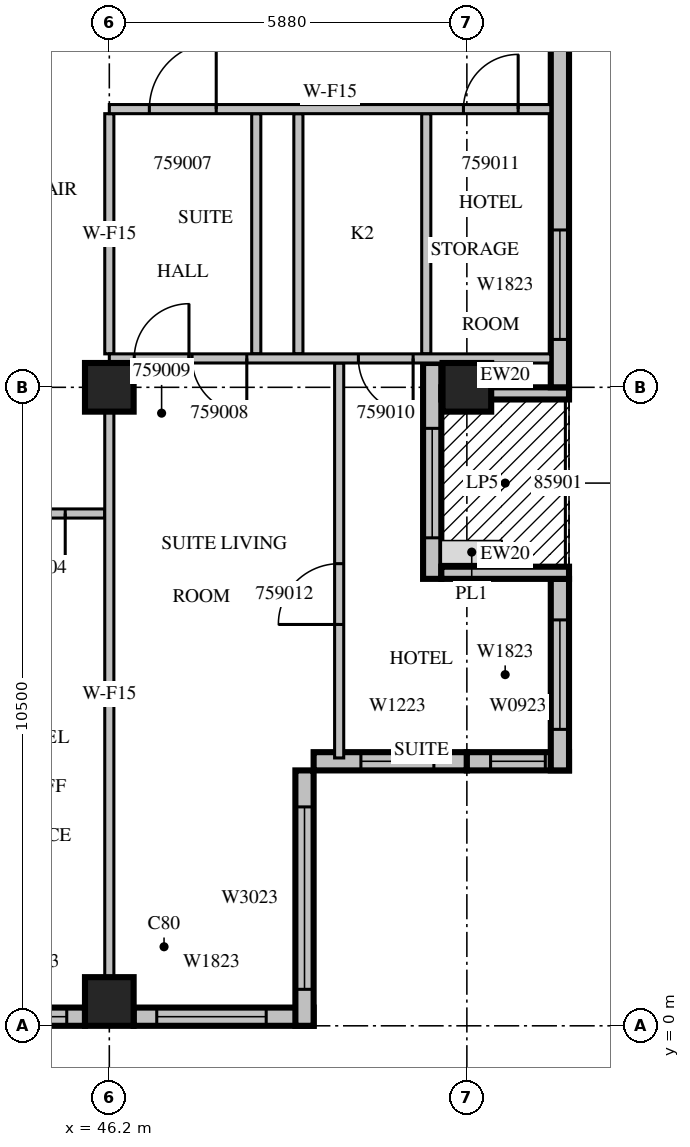
"""IFC4 building model, lengths in metres.
Left out: names, types, materials, properties, quantities, classifications, styles, units other than length and angle.
Written with IfcOpenShell. Run it as: python <this file> out.ifc"""

import sys

from ifc_helpers import new_model, si_unit, direction, frame, frame_2d, origin, origin_2d, place, context, subcontext, project, spatial, rectangle, extrude, source, transform, mapped, element, fill, save


model = new_model("IFC4")
c1 = context("Model", 3, precision=1e-05, world=origin(), true_north=direction((0.0, 1.0)))
c2 = subcontext(c1, "Body", "Model", "MODEL_VIEW")
j1 = project(units=[si_unit("LENGTHUNIT", "METRE"), si_unit("PLANEANGLEUNIT", "RADIAN")], contexts=[c1])
p1 = place(None, origin())
s1 = spatial("IfcSite", under=j1, at=p1, CompositionType="ELEMENT")
p2 = place(p1, origin())
s2 = spatial("IfcBuilding", under=s1, at=p2, CompositionType="ELEMENT")
p3 = place(p2, frame((0.0, 0.0, 257.6)))
s3 = spatial("IfcBuildingStorey", under=s2, at=p3, CompositionType="ELEMENT", Elevation=257.6)
m1 = source(origin(), c2, "Body", "SweptSolid", [
    extrude(rectangle(XDim=0.8, YDim=0.8, at=origin_2d()), origin(), (0.0, 0.0, 1.0), 3.8),
])
for number, where, z_axis, x_axis in (
    (1, (46.2, 0.4, 0.0), (0.0, 0.0, 1.0), (1.0, 0.0, 0.0)),
    (2, (46.2, 10.5, 0.0), (0.0, 0.0, 1.0), (1.0, 0.0, 0.0)),
    (3, (52.08, 10.5, 0.0), (0.0, 0.0, 1.0), (1.0, 0.0, 0.0)),
):
    element("IfcColumn", number, at=place(p3, frame(where, z_axis=z_axis, x_axis=x_axis)), inside=s3, PredefinedType="COLUMN", context=c2, shape_type="MappedRepresentation", body=[
        mapped(m1, transform((0.0, 0.0, 0.0), scale=1.0)),
    ])
m2 = source(origin(), c2, "Body", "SweptSolid", [
    extrude(rectangle(XDim=1.8, YDim=0.3, at=frame_2d((0.9, 0.0))), origin(), (0.0, 0.0, 1.0), 3.4),
])
p4 = place(p3, frame((44.0, 0.15, 0.0), z_axis=(0.0, 0.0, 1.0), x_axis=(1.0, 0.0, 0.0)))
e4 = element("IfcWall", 4, at=p4, inside=s3, PredefinedType="STANDARD", context=c2, shape_type="MappedRepresentation", body=[
    mapped(m2, transform((0.0, 0.0, 0.0), scale=1.0)),
])
m3 = source(origin(), c2, "Body", "SweptSolid", [
    extrude(rectangle(XDim=1.2, YDim=2.3, at=frame_2d((0.6, 1.15))), frame((0.0, 0.16, 0.0), z_axis=(0.0, -1.0, 0.0), x_axis=(1.0, 0.0, 0.0)), (0.0, 0.0, 1.0), 0.32),
])
p5 = place(p4, frame((0.3, 0.0, 0.6)))
e5 = element("IfcOpeningElement", 5, at=p5, cuts=e4, PredefinedType="OPENING", context=c2, shape_type="MappedRepresentation", body=[
    mapped(m3, transform((0.0, 0.0, 0.0), scale=1.0)),
])
m4 = source(origin(), c2, "Body", "SweptSolid", [
    extrude(rectangle(XDim=2.96, YDim=0.3, at=frame_2d((1.48, 0.0))), origin(), (0.0, 0.0, 1.0), 3.4),
])
p6 = place(p3, frame((46.6, 0.15, 0.0), z_axis=(0.0, 0.0, 1.0), x_axis=(1.0, 0.0, 0.0)))
e6 = element("IfcWall", 6, at=p6, inside=s3, PredefinedType="STANDARD", context=c2, shape_type="MappedRepresentation", body=[
    mapped(m4, transform((0.0, 0.0, 0.0), scale=1.0)),
])
m5 = source(origin(), c2, "Body", "SweptSolid", [
    extrude(rectangle(XDim=1.8, YDim=2.3, at=frame_2d((0.9, 1.15))), frame((0.0, 0.16, 0.0), z_axis=(0.0, -1.0, 0.0), x_axis=(1.0, 0.0, 0.0)), (0.0, 0.0, 1.0), 0.32),
])
p7 = place(p6, frame((0.38, 0.0, 0.6)))
e7 = element("IfcOpeningElement", 7, at=p7, cuts=e6, PredefinedType="OPENING", context=c2, shape_type="MappedRepresentation", body=[
    mapped(m5, transform((0.0, 0.0, 0.0), scale=1.0)),
])
m6 = source(origin(), c2, "Body", "SweptSolid", [
    extrude(rectangle(XDim=4.2, YDim=0.3, at=frame_2d((2.1, 0.0))), origin(), (0.0, 0.0, 1.0), 3.4),
])
p8 = place(p3, frame((49.41, 0.0, 0.0), z_axis=(0.0, 0.0, 1.0), x_axis=(0.0, 1.0, 0.0)))
e8 = element("IfcWall", 8, at=p8, inside=s3, PredefinedType="STANDARD", context=c2, shape_type="MappedRepresentation", body=[
    mapped(m6, transform((0.0, 0.0, 0.0), scale=1.0)),
])
m7 = source(origin(), c2, "Body", "SweptSolid", [
    extrude(rectangle(XDim=3.0, YDim=2.3, at=frame_2d((1.5, 1.15))), frame((0.0, 0.16, 0.0), z_axis=(0.0, -1.0, 0.0), x_axis=(1.0, 0.0, 0.0)), (0.0, 0.0, 1.0), 0.32),
])
p9 = place(p8, frame((0.6, 0.0, 0.6)))
e9 = element("IfcOpeningElement", 9, at=p9, cuts=e8, PredefinedType="OPENING", context=c2, shape_type="MappedRepresentation", body=[
    mapped(m7, transform((0.0, 0.0, 0.0), scale=1.0)),
])
m8 = source(origin(), c2, "Body", "SweptSolid", [
    extrude(rectangle(XDim=2.52, YDim=0.3, at=frame_2d((1.26, 0.0))), origin(), (0.0, 0.0, 1.0), 3.4),
])
p10 = place(p3, frame((49.56, 4.35, 0.0), z_axis=(0.0, 0.0, 1.0), x_axis=(1.0, 0.0, 0.0)))
e10 = element("IfcWall", 10, at=p10, inside=s3, PredefinedType="STANDARD", context=c2, shape_type="MappedRepresentation", body=[
    mapped(m8, transform((0.0, 0.0, 0.0), scale=1.0)),
])
p11 = place(p10, frame((0.777, 0.0, 0.6)))
e11 = element("IfcOpeningElement", 11, at=p11, cuts=e10, PredefinedType="OPENING", context=c2, shape_type="MappedRepresentation", body=[
    mapped(m3, transform((0.0, 0.0, 0.0), scale=1.0)),
])
m9 = source(origin(), c2, "Body", "SweptSolid", [
    extrude(rectangle(XDim=1.68, YDim=0.3, at=frame_2d((0.84, 0.0))), origin(), (0.0, 0.0, 1.0), 3.4),
])
p12 = place(p3, frame((52.08, 4.35, 0.0), z_axis=(0.0, 0.0, 1.0), x_axis=(1.0, 0.0, 0.0)))
e12 = element("IfcWall", 12, at=p12, inside=s3, PredefinedType="STANDARD", context=c2, shape_type="MappedRepresentation", body=[
    mapped(m9, transform((0.0, 0.0, 0.0), scale=1.0)),
])
m10 = source(origin(), c2, "Body", "SweptSolid", [
    extrude(rectangle(XDim=0.9, YDim=2.3, at=frame_2d((0.45, 1.15))), frame((0.0, 0.16, 0.0), z_axis=(0.0, -1.0, 0.0), x_axis=(1.0, 0.0, 0.0)), (0.0, 0.0, 1.0), 0.32),
])
p13 = place(p12, frame((0.39, 0.0, 0.6)))
e13 = element("IfcOpeningElement", 13, at=p13, cuts=e12, PredefinedType="OPENING", context=c2, shape_type="MappedRepresentation", body=[
    mapped(m10, transform((0.0, 0.0, 0.0), scale=1.0)),
])
m11 = source(origin(), c2, "Body", "SweptSolid", [
    extrude(rectangle(XDim=3.15, YDim=0.3, at=frame_2d((1.575, 0.0))), origin(), (0.0, 0.0, 1.0), 3.4),
])
p14 = place(p3, frame((53.61, 4.2, 0.0), z_axis=(0.0, 0.0, 1.0), x_axis=(0.0, 1.0, 0.0)))
e14 = element("IfcWall", 14, at=p14, inside=s3, PredefinedType="STANDARD", context=c2, shape_type="MappedRepresentation", body=[
    mapped(m11, transform((0.0, 0.0, 0.0), scale=1.0)),
])
p15 = place(p14, frame((0.675, 0.0, 0.6)))
e15 = element("IfcOpeningElement", 15, at=p15, cuts=e14, PredefinedType="OPENING", context=c2, shape_type="MappedRepresentation", body=[
    mapped(m5, transform((0.0, 0.0, 0.0), scale=1.0)),
])
m12 = source(origin(), c2, "Body", "SweptSolid", [
    extrude(rectangle(XDim=3.55, YDim=0.3, at=frame_2d((1.775, 0.0))), origin(), (0.0, 0.0, 1.0), 3.4),
])
p16 = place(p3, frame((51.51, 7.35, 0.0), z_axis=(0.0, 0.0, 1.0), x_axis=(0.0, 1.0, 0.0)))
e16 = element("IfcWall", 16, at=p16, inside=s3, PredefinedType="STANDARD", context=c2, shape_type="MappedRepresentation", body=[
    mapped(m12, transform((0.0, 0.0, 0.0), scale=1.0)),
])
m13 = source(origin(), c2, "Body", "SweptSolid", [
    extrude(rectangle(XDim=1.8, YDim=2.4, at=frame_2d((0.9, 1.2))), frame((0.0, 0.16, 0.0), z_axis=(0.0, -1.0, 0.0), x_axis=(1.0, 0.0, 0.0)), (0.0, 0.0, 1.0), 0.32),
])
p17 = place(p16, frame((0.675, 0.0, 0.0)))
e17 = element("IfcOpeningElement", 17, at=p17, cuts=e16, PredefinedType="OPENING", context=c2, shape_type="MappedRepresentation", body=[
    mapped(m13, transform((0.0, 0.0, 0.0), scale=1.0)),
])
m14 = source(origin(), c2, "Body", "SweptSolid", [
    extrude(rectangle(XDim=2.1, YDim=0.2, at=frame_2d((1.05, 0.0))), origin(), (0.0, 0.0, 1.0), 3.4),
])
for number, where, z_axis, x_axis in (
    (18, (53.76, 7.45, 0.0), (0.0, 0.0, 1.0), (-1.0, 0.0, 0.0)),
    (19, (53.76, 10.4, 0.0), (0.0, 0.0, 1.0), (-1.0, 0.0, 0.0)),
):
    element("IfcWall", number, at=place(p3, frame(where, z_axis=z_axis, x_axis=x_axis)), inside=s3, PredefinedType="STANDARD", context=c2, shape_type="MappedRepresentation", body=[
        mapped(m14, transform((0.0, 0.0, 0.0), scale=1.0)),
    ])
m15 = source(origin(), c2, "Body", "SweptSolid", [
    extrude(rectangle(XDim=6.75, YDim=0.3, at=frame_2d((3.375, 0.0))), origin(), (0.0, 0.0, 1.0), 3.4),
])
p18 = place(p3, frame((53.61, 10.5, 0.0), z_axis=(0.0, 0.0, 1.0), x_axis=(0.0, 1.0, 0.0)))
e20 = element("IfcWall", 20, at=p18, inside=s3, PredefinedType="STANDARD", context=c2, shape_type="MappedRepresentation", body=[
    mapped(m15, transform((0.0, 0.0, 0.0), scale=1.0)),
])
p19 = place(p18, frame((0.787, 0.0, 0.6)))
e21 = element("IfcOpeningElement", 21, at=p19, cuts=e20, PredefinedType="OPENING", context=c2, shape_type="MappedRepresentation", body=[
    mapped(m5, transform((0.0, 0.0, 0.0), scale=1.0)),
])
m16 = source(origin(), c2, "Body", "SweptSolid", [
    extrude(rectangle(XDim=2.2, YDim=0.15, at=frame_2d((1.1, 0.0))), origin(), (0.0, 0.0, 1.0), 3.4),
])
p20 = place(p3, frame((46.125, 8.425, 0.0), z_axis=(0.0, 0.0, 1.0), x_axis=(-1.0, 0.0, 0.0)))
e22 = element("IfcWall", 22, at=p20, inside=s3, PredefinedType="PARTITIONING", context=c2, shape_type="MappedRepresentation", body=[
    mapped(m16, transform((0.0, 0.0, 0.0), scale=1.0)),
])
m17 = source(origin(), c2, "Body", "SweptSolid", [
    extrude(rectangle(XDim=0.9, YDim=2.1, at=frame_2d((0.45, 1.05))), frame((0.0, 0.085, 0.0), z_axis=(0.0, -1.0, 0.0), x_axis=(1.0, 0.0, 0.0)), (0.0, 0.0, 1.0), 0.17),
])
p21 = place(p20, frame((0.65, 0.0, 0.0)))
e23 = element("IfcOpeningElement", 23, at=p21, cuts=e22, PredefinedType="OPENING", context=c2, shape_type="MappedRepresentation", body=[
    mapped(m17, transform((0.0, 0.0, 0.0), scale=1.0)),
])
m18 = source(origin(), c2, "Body", "SweptSolid", [
    extrude(rectangle(XDim=6.495, YDim=0.15, at=frame_2d((3.248, 0.0))), origin(), (0.0, 0.0, 1.0), 3.4),
])
p22 = place(p3, frame((49.98, 4.405, 0.0), z_axis=(0.0, 0.0, 1.0), x_axis=(0.0, 1.0, 0.0)))
e24 = element("IfcWall", 24, at=p22, inside=s3, PredefinedType="PARTITIONING", context=c2, shape_type="MappedRepresentation", body=[
    mapped(m18, transform((0.0, 0.0, 0.0), scale=1.0)),
])
m19 = source(origin(), c2, "Body", "SweptSolid", [
    extrude(rectangle(XDim=1.0, YDim=2.1, at=frame_2d((0.5, 1.05))), frame((0.0, 0.085, 0.0), z_axis=(0.0, -1.0, 0.0), x_axis=(1.0, 0.0, 0.0)), (0.0, 0.0, 1.0), 0.17),
])
p23 = place(p22, frame((2.195, 0.0, 0.0)))
e25 = element("IfcOpeningElement", 25, at=p23, cuts=e24, PredefinedType="OPENING", context=c2, shape_type="MappedRepresentation", body=[
    mapped(m19, transform((0.0, 0.0, 0.0), scale=1.0)),
])
m20 = source(origin(), c2, "Body", "SweptSolid", [
    extrude(rectangle(XDim=3.95, YDim=0.15, at=frame_2d((1.975, 0.0))), origin(), (0.0, 0.0, 1.0), 3.4),
])
for number, where, z_axis, x_axis in (
    (26, (48.617, 11.05, 0.0), (0.0, 0.0, 1.0), (0.0, 1.0, 0.0)),
    (27, (49.309, 11.05, 0.0), (0.0, 0.0, 1.0), (0.0, 1.0, 0.0)),
    (28, (51.412, 11.05, 0.0), (0.0, 0.0, 1.0), (0.0, 1.0, 0.0)),
):
    element("IfcWall", number, at=place(p3, frame(where, z_axis=z_axis, x_axis=x_axis)), inside=s3, PredefinedType="PARTITIONING", context=c2, shape_type="MappedRepresentation", body=[
        mapped(m20, transform((0.0, 0.0, 0.0), scale=1.0)),
    ])
m21 = source(origin(), c2, "Body", "SweptSolid", [
    extrude(rectangle(XDim=9.302, YDim=0.15, at=frame_2d((4.651, 0.0))), origin(), (0.0, 0.0, 1.0), 3.4),
])
p24 = place(p3, frame((46.2, 0.799, 0.0), z_axis=(0.0, 0.0, 1.0), x_axis=(0.0, 1.0, 0.0)))
e29 = element("IfcWall", 29, at=p24, inside=s3, PredefinedType="PARTITIONING", context=c2, shape_type="MappedRepresentation", body=[
    mapped(m21, transform((0.0, 0.0, 0.0), scale=1.0)),
])
p25 = place(p3, frame((46.2, 11.05, 0.0), z_axis=(0.0, 0.0, 1.0), x_axis=(0.0, 1.0, 0.0)))
e30 = element("IfcWall", 30, at=p25, inside=s3, PredefinedType="PARTITIONING", context=c2, shape_type="MappedRepresentation", body=[
    mapped(m20, transform((0.0, 0.0, 0.0), scale=1.0)),
])
m22 = source(origin(), c2, "Body", "SweptSolid", [
    extrude(rectangle(XDim=7.26, YDim=0.15, at=frame_2d((3.63, 0.0))), origin(), (0.0, 0.0, 1.0), 3.4),
])
p26 = place(p3, frame((53.46, 10.975, 0.0), z_axis=(0.0, 0.0, 1.0), x_axis=(-1.0, 0.0, 0.0)))
e31 = element("IfcWall", 31, at=p26, inside=s3, PredefinedType="PARTITIONING", context=c2, shape_type="MappedRepresentation", body=[
    mapped(m22, transform((0.0, 0.0, 0.0), scale=1.0)),
])
p27 = place(p26, frame((4.999, 0.0, 0.0)))
e32 = element("IfcOpeningElement", 32, at=p27, cuts=e31, PredefinedType="OPENING", context=c2, shape_type="MappedRepresentation", body=[
    mapped(m17, transform((0.0, 0.0, 0.0), scale=1.0)),
])
p28 = place(p26, frame((5.95, 0.0, 0.0)))
e33 = element("IfcOpeningElement", 33, at=p28, cuts=e31, PredefinedType="OPENING", context=c2, shape_type="MappedRepresentation", body=[
    mapped(m17, transform((0.0, 0.0, 0.0), scale=1.0)),
])
p29 = place(p26, frame((2.264, 0.0, 0.0)))
e34 = element("IfcOpeningElement", 34, at=p29, cuts=e31, PredefinedType="OPENING", context=c2, shape_type="MappedRepresentation", body=[
    mapped(m17, transform((0.0, 0.0, 0.0), scale=1.0)),
])
p30 = place(p3, frame((53.46, 15.075, 0.0), z_axis=(0.0, 0.0, 1.0), x_axis=(-1.0, 0.0, 0.0)))
e35 = element("IfcWall", 35, at=p30, inside=s3, PredefinedType="PARTITIONING", context=c2, shape_type="MappedRepresentation", body=[
    mapped(m22, transform((0.0, 0.0, 0.0), scale=1.0)),
])
m23 = source(origin(), c2, "Body", "SweptSolid", [
    extrude(rectangle(XDim=1.1, YDim=2.1, at=frame_2d((0.55, 1.05))), frame((0.0, 0.085, 0.0), z_axis=(0.0, -1.0, 0.0), x_axis=(1.0, 0.0, 0.0)), (0.0, 0.0, 1.0), 0.17),
])
p31 = place(p30, frame((5.502, 0.0, 0.0)))
e36 = element("IfcOpeningElement", 36, at=p31, cuts=e35, PredefinedType="OPENING", context=c2, shape_type="MappedRepresentation", body=[
    mapped(m23, transform((0.0, 0.0, 0.0), scale=1.0)),
])
p32 = place(p30, frame((0.536, 0.0, 0.0)))
e37 = element("IfcOpeningElement", 37, at=p32, cuts=e35, PredefinedType="OPENING", context=c2, shape_type="MappedRepresentation", body=[
    mapped(m17, transform((0.0, 0.0, 0.0), scale=1.0)),
])
m24 = source(origin(), c2, "Body", "SweptSolid", [
    extrude(rectangle(XDim=1.2, YDim=2.3, at=frame_2d((0.6, 1.15))), frame((0.0, 0.03, 0.0), z_axis=(0.0, -1.0, 0.0), x_axis=(1.0, 0.0, 0.0)), (0.0, 0.0, 1.0), 0.06),
])
p33 = place(p5, origin())
e38 = element("IfcWindow", 38, at=p33, inside=s3, PartitioningType="SINGLE_PANEL", PredefinedType="WINDOW", context=c2, shape_type="MappedRepresentation", body=[
    mapped(m24, transform((0.0, 0.0, 0.0), scale=1.0)),
])
fill(e5, e38)
m25 = source(origin(), c2, "Body", "SweptSolid", [
    extrude(rectangle(XDim=1.8, YDim=2.3, at=frame_2d((0.9, 1.15))), frame((0.0, 0.03, 0.0), z_axis=(0.0, -1.0, 0.0), x_axis=(1.0, 0.0, 0.0)), (0.0, 0.0, 1.0), 0.06),
])
p34 = place(p7, origin())
e39 = element("IfcWindow", 39, at=p34, inside=s3, PartitioningType="SINGLE_PANEL", PredefinedType="WINDOW", context=c2, shape_type="MappedRepresentation", body=[
    mapped(m25, transform((0.0, 0.0, 0.0), scale=1.0)),
])
fill(e7, e39)
m26 = source(origin(), c2, "Body", "SweptSolid", [
    extrude(rectangle(XDim=3.0, YDim=2.3, at=frame_2d((1.5, 1.15))), frame((0.0, 0.03, 0.0), z_axis=(0.0, -1.0, 0.0), x_axis=(1.0, 0.0, 0.0)), (0.0, 0.0, 1.0), 0.06),
])
p35 = place(p9, origin())
e40 = element("IfcWindow", 40, at=p35, inside=s3, PartitioningType="SINGLE_PANEL", PredefinedType="WINDOW", context=c2, shape_type="MappedRepresentation", body=[
    mapped(m26, transform((0.0, 0.0, 0.0), scale=1.0)),
])
fill(e9, e40)
p36 = place(p11, origin())
e41 = element("IfcWindow", 41, at=p36, inside=s3, PartitioningType="SINGLE_PANEL", PredefinedType="WINDOW", context=c2, shape_type="MappedRepresentation", body=[
    mapped(m24, transform((0.0, 0.0, 0.0), scale=1.0)),
])
fill(e11, e41)
m27 = source(origin(), c2, "Body", "SweptSolid", [
    extrude(rectangle(XDim=0.9, YDim=2.3, at=frame_2d((0.45, 1.15))), frame((0.0, 0.03, 0.0), z_axis=(0.0, -1.0, 0.0), x_axis=(1.0, 0.0, 0.0)), (0.0, 0.0, 1.0), 0.06),
])
p37 = place(p13, origin())
e42 = element("IfcWindow", 42, at=p37, inside=s3, PartitioningType="SINGLE_PANEL", PredefinedType="WINDOW", context=c2, shape_type="MappedRepresentation", body=[
    mapped(m27, transform((0.0, 0.0, 0.0), scale=1.0)),
])
fill(e13, e42)
p38 = place(p15, origin())
e43 = element("IfcWindow", 43, at=p38, inside=s3, PartitioningType="SINGLE_PANEL", PredefinedType="WINDOW", context=c2, shape_type="MappedRepresentation", body=[
    mapped(m25, transform((0.0, 0.0, 0.0), scale=1.0)),
])
fill(e15, e43)
m28 = source(origin(), c2, "Body", "SweptSolid", [
    extrude(rectangle(XDim=1.8, YDim=2.4, at=frame_2d((0.9, 1.2))), frame((0.0, 0.025, 0.0), z_axis=(0.0, -1.0, 0.0), x_axis=(1.0, 0.0, 0.0)), (0.0, 0.0, 1.0), 0.05),
])
p39 = place(p17, origin())
e44 = element("IfcDoor", 44, at=p39, inside=s3, OperationType="SLIDING_TO_LEFT", PredefinedType="DOOR", context=c2, shape_type="MappedRepresentation", body=[
    mapped(m28, transform((0.0, 0.0, 0.0), scale=1.0)),
])
fill(e17, e44)
p40 = place(p19, origin())
e45 = element("IfcWindow", 45, at=p40, inside=s3, PartitioningType="SINGLE_PANEL", PredefinedType="WINDOW", context=c2, shape_type="MappedRepresentation", body=[
    mapped(m25, transform((0.0, 0.0, 0.0), scale=1.0)),
])
fill(e21, e45)
m29 = source(origin(), c2, "Body", "SweptSolid", [
    extrude(rectangle(XDim=0.9, YDim=2.1, at=frame_2d((0.45, 1.05))), frame((0.0, 0.025, 0.0), z_axis=(0.0, -1.0, 0.0), x_axis=(1.0, 0.0, 0.0)), (0.0, 0.0, 1.0), 0.05),
])
p41 = place(p21, origin())
e46 = element("IfcDoor", 46, at=p41, inside=s3, OperationType="SINGLE_SWING_LEFT", PredefinedType="DOOR", context=c2, shape_type="MappedRepresentation", body=[
    mapped(m29, transform((0.0, 0.0, 0.0), scale=1.0)),
])
fill(e23, e46)
m30 = source(origin(), c2, "Body", "SweptSolid", [
    extrude(rectangle(XDim=1.1, YDim=2.1, at=frame_2d((0.55, 1.05))), frame((0.0, 0.025, 0.0), z_axis=(0.0, -1.0, 0.0), x_axis=(1.0, 0.0, 0.0)), (0.0, 0.0, 1.0), 0.05),
])
p42 = place(p31, origin())
e47 = element("IfcDoor", 47, at=p42, inside=s3, OperationType="SINGLE_SWING_RIGHT", PredefinedType="DOOR", context=c2, shape_type="MappedRepresentation", body=[
    mapped(m30, transform((0.0, 0.0, 0.0), scale=1.0)),
])
fill(e36, e47)
p43 = place(p27, origin())
e48 = element("IfcDoor", 48, at=p43, inside=s3, OperationType="SINGLE_SWING_LEFT", PredefinedType="DOOR", context=c2, shape_type="MappedRepresentation", body=[
    mapped(m29, transform((0.0, 0.0, 0.0), scale=1.0)),
])
fill(e32, e48)
p44 = place(p28, origin())
e49 = element("IfcDoor", 49, at=p44, inside=s3, OperationType="SINGLE_SWING_RIGHT", PredefinedType="DOOR", context=c2, shape_type="MappedRepresentation", body=[
    mapped(m29, transform((0.0, 0.0, 0.0), scale=1.0)),
])
fill(e33, e49)
p45 = place(p29, origin())
e50 = element("IfcDoor", 50, at=p45, inside=s3, OperationType="SINGLE_SWING_LEFT", PredefinedType="DOOR", context=c2, shape_type="MappedRepresentation", body=[
    mapped(m29, transform((0.0, 0.0, 0.0), scale=1.0)),
])
fill(e34, e50)
p46 = place(p32, origin())
e51 = element("IfcDoor", 51, at=p46, inside=s3, OperationType="SINGLE_SWING_RIGHT", PredefinedType="DOOR", context=c2, shape_type="MappedRepresentation", body=[
    mapped(m29, transform((0.0, 0.0, 0.0), scale=1.0)),
])
fill(e37, e51)
m31 = source(origin(), c2, "Body", "SweptSolid", [
    extrude(rectangle(XDim=1.0, YDim=2.1, at=frame_2d((0.5, 1.05))), frame((0.0, 0.025, 0.0), z_axis=(0.0, -1.0, 0.0), x_axis=(1.0, 0.0, 0.0)), (0.0, 0.0, 1.0), 0.05),
])
p47 = place(p23, origin())
e52 = element("IfcDoor", 52, at=p47, inside=s3, OperationType="SINGLE_SWING_LEFT", PredefinedType="DOOR", context=c2, shape_type="MappedRepresentation", body=[
    mapped(m31, transform((0.0, 0.0, 0.0), scale=1.0)),
])
fill(e25, e52)
save(model, sys.argv[1])
